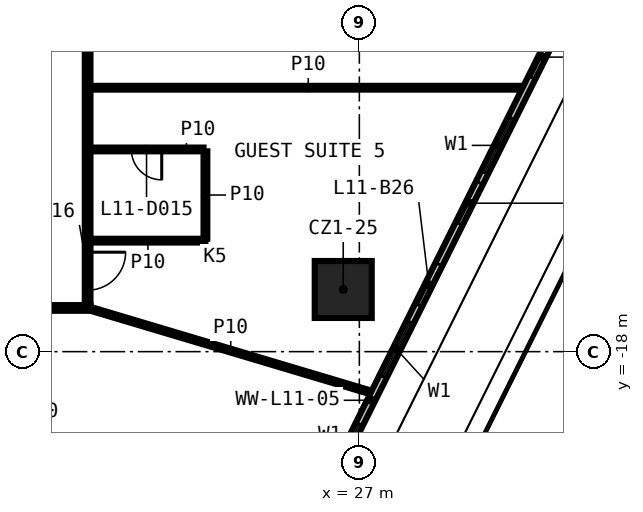
"""IFC4 building model, lengths in metres.
Left out: names, types, materials, properties, quantities, classifications, styles, units other than length and angle.
Written with IfcOpenShell. Run it as: python <this file> out.ifc"""

import sys

from ifc_helpers import new_model, si_unit, direction, frame, frame_2d, origin, origin_2d, place, context, subcontext, project, spatial, rectangle, extrude, element, fill, save


model = new_model("IFC4")
c1 = context("Model", 3, precision=1e-05, world=origin(), true_north=direction((0.0, 1.0)))
c2 = subcontext(c1, "Body", "Model", "MODEL_VIEW")
j1 = project(units=[si_unit("LENGTHUNIT", "METRE"), si_unit("PLANEANGLEUNIT", "RADIAN")], contexts=[c1])
p1 = place(None, origin())
s1 = spatial("IfcSite", under=j1, at=p1, CompositionType="ELEMENT")
p2 = place(p1, origin())
s2 = spatial("IfcBuilding", under=s1, at=p2, CompositionType="ELEMENT")
p3 = place(p2, frame((0.0, 0.0, 62.5)))
s3 = spatial("IfcBuildingStorey", under=s2, at=p3, CompositionType="ELEMENT", Elevation=62.5)
p4 = place(p3, frame((26.576, -16.364, 0.0), z_axis=(0.0, 0.0, 1.0), x_axis=(1.0, 0.0, 0.0)))
e1 = element("IfcColumn", 1, at=p4, inside=s3, PredefinedType="COLUMN", context=c2, shape_type="SweptSolid", body=[
    extrude(rectangle(XDim=1.5, YDim=1.5, at=origin_2d()), origin(), (0.0, 0.0, 1.0), 3.3),
])
p5 = place(p3, frame((19.925, -16.85, 0.0), z_axis=(0.0, 0.0, 1.0), x_axis=(-1.0, 0.0, 0.0)))
e2 = element("IfcWall", 2, at=p5, inside=s3, PredefinedType="PARTITIONING", context=c2, shape_type="SweptSolid", body=[
    extrude(rectangle(XDim=39.85, YDim=0.15, at=frame_2d((19.925, 0.0))), origin(), (0.0, 0.0, 1.0), 3.3),
])
p6 = place(p5, frame((35.041, 0.0, 0.0)))
e3 = element("IfcOpeningElement", 3, at=p6, cuts=e2, PredefinedType="OPENING", context=c2, shape_type="SweptSolid", body=[
    extrude(rectangle(XDim=0.9, YDim=2.1, at=frame_2d((0.45, 1.05))), frame((0.0, 0.085, 0.0), z_axis=(0.0, -1.0, 0.0), x_axis=(1.0, 0.0, 0.0)), (0.0, 0.0, 1.0), 0.17),
])
p7 = place(p5, frame((31.0, 0.0, 0.0)))
e4 = element("IfcOpeningElement", 4, at=p7, cuts=e2, PredefinedType="OPENING", context=c2, shape_type="SweptSolid", body=[
    extrude(rectangle(XDim=1.0, YDim=2.1, at=frame_2d((0.5, 1.05))), frame((0.0, 0.085, 0.0), z_axis=(0.0, -1.0, 0.0), x_axis=(1.0, 0.0, 0.0)), (0.0, 0.0, 1.0), 0.17),
])
p8 = place(p5, frame((25.711, 0.0, 0.0)))
e5 = element("IfcOpeningElement", 5, at=p8, cuts=e2, PredefinedType="OPENING", context=c2, shape_type="SweptSolid", body=[
    extrude(rectangle(XDim=0.9, YDim=2.1, at=frame_2d((0.45, 1.05))), frame((0.0, 0.085, 0.0), z_axis=(0.0, -1.0, 0.0), x_axis=(1.0, 0.0, 0.0)), (0.0, 0.0, 1.0), 0.17),
])
p9 = place(p5, frame((22.072, 0.0, 0.0)))
e6 = element("IfcOpeningElement", 6, at=p9, cuts=e2, PredefinedType="OPENING", context=c2, shape_type="SweptSolid", body=[
    extrude(rectangle(XDim=0.9, YDim=2.1, at=frame_2d((0.45, 1.05))), frame((0.0, 0.085, 0.0), z_axis=(0.0, -1.0, 0.0), x_axis=(1.0, 0.0, 0.0)), (0.0, 0.0, 1.0), 0.17),
])
p10 = place(p5, frame((17.034, 0.0, 0.0)))
e7 = element("IfcOpeningElement", 7, at=p10, cuts=e2, PredefinedType="OPENING", context=c2, shape_type="SweptSolid", body=[
    extrude(rectangle(XDim=0.9, YDim=2.1, at=frame_2d((0.45, 1.05))), frame((0.0, 0.085, 0.0), z_axis=(0.0, -1.0, 0.0), x_axis=(1.0, 0.0, 0.0)), (0.0, 0.0, 1.0), 0.17),
])
p11 = place(p5, frame((13.675, 0.0, 0.0)))
e8 = element("IfcOpeningElement", 8, at=p11, cuts=e2, PredefinedType="OPENING", context=c2, shape_type="SweptSolid", body=[
    extrude(rectangle(XDim=0.9, YDim=2.1, at=frame_2d((0.45, 1.05))), frame((0.0, 0.085, 0.0), z_axis=(0.0, -1.0, 0.0), x_axis=(1.0, 0.0, 0.0)), (0.0, 0.0, 1.0), 0.17),
])
p12 = place(p5, frame((4.031, 0.0, 0.0)))
e9 = element("IfcOpeningElement", 9, at=p12, cuts=e2, PredefinedType="OPENING", context=c2, shape_type="SweptSolid", body=[
    extrude(rectangle(XDim=1.0, YDim=2.1, at=frame_2d((0.5, 1.05))), frame((0.0, 0.085, 0.0), z_axis=(0.0, -1.0, 0.0), x_axis=(1.0, 0.0, 0.0)), (0.0, 0.0, 1.0), 0.17),
])
p13 = place(p3, frame((19.925, -15.079, 0.0), z_axis=(0.0, 0.0, 1.0), x_axis=(1.0, 0.0, 0.0)))
e10 = element("IfcWall", 10, at=p13, inside=s3, PredefinedType="PARTITIONING", context=c2, shape_type="SweptSolid", body=[
    extrude(rectangle(XDim=3.025, YDim=0.1, at=frame_2d((1.512, 0.0))), origin(), (0.0, 0.0, 1.0), 3.3),
])
p14 = place(p3, frame((22.9, -12.679, 0.0), z_axis=(0.0, 0.0, 1.0), x_axis=(-1.0, 0.0, 0.0)))
e11 = element("IfcWall", 11, at=p14, inside=s3, PredefinedType="PARTITIONING", context=c2, shape_type="SweptSolid", body=[
    extrude(rectangle(XDim=2.975, YDim=0.1, at=frame_2d((1.487, 0.0))), origin(), (0.0, 0.0, 1.0), 3.3),
])
p15 = place(p14, frame((1.1, 0.0, 0.0)))
e12 = element("IfcOpeningElement", 12, at=p15, cuts=e11, PredefinedType="OPENING", context=c2, shape_type="SweptSolid", body=[
    extrude(rectangle(XDim=0.8, YDim=2.1, at=frame_2d((0.4, 1.05))), frame((0.0, 0.06, 0.0), z_axis=(0.0, -1.0, 0.0), x_axis=(1.0, 0.0, 0.0)), (0.0, 0.0, 1.0), 0.12),
])
p16 = place(p3, frame((19.925, -11.055, 0.0), z_axis=(0.0, 0.0, 1.0), x_axis=(1.0, 0.0, 0.0)))
e13 = element("IfcWall", 13, at=p16, inside=s3, PredefinedType="PARTITIONING", context=c2, shape_type="SweptSolid", body=[
    extrude(rectangle(XDim=11.46, YDim=0.1, at=frame_2d((5.73, 0.0))), origin(), (0.0, 0.0, 1.0), 3.3),
])
p17 = place(p3, frame((22.95, -15.029, 0.0), z_axis=(0.0, 0.0, 1.0), x_axis=(0.0, 1.0, 0.0)))
e14 = element("IfcWall", 14, at=p17, inside=s3, PredefinedType="PARTITIONING", context=c2, shape_type="SweptSolid", body=[
    extrude(rectangle(XDim=2.3, YDim=0.1, at=frame_2d((1.15, 0.0))), origin(), (0.0, 0.0, 1.0), 3.3),
])
p18 = place(p3, frame((19.85, 16.775, 0.0), z_axis=(0.0, 0.0, 1.0), x_axis=(0.0, -1.0, 0.0)))
e15 = element("IfcWall", 15, at=p18, inside=s3, PredefinedType="PARTITIONING", context=c2, shape_type="SweptSolid", body=[
    extrude(rectangle(XDim=33.55, YDim=0.15, at=frame_2d((16.775, 0.0))), origin(), (0.0, 0.0, 1.0), 3.3),
])
p19 = place(p18, frame((32.158, 0.0, 0.0)))
e16 = element("IfcOpeningElement", 16, at=p19, cuts=e15, PredefinedType="OPENING", context=c2, shape_type="SweptSolid", body=[
    extrude(rectangle(XDim=1.0, YDim=2.1, at=frame_2d((0.5, 1.05))), frame((0.0, 0.085, 0.0), z_axis=(0.0, -1.0, 0.0), x_axis=(1.0, 0.0, 0.0)), (0.0, 0.0, 1.0), 0.17),
])
p20 = place(p18, frame((20.094, 0.0, 0.0)))
e17 = element("IfcOpeningElement", 17, at=p20, cuts=e15, PredefinedType="OPENING", context=c2, shape_type="SweptSolid", body=[
    extrude(rectangle(XDim=1.0, YDim=2.1, at=frame_2d((0.5, 1.05))), frame((0.0, 0.085, 0.0), z_axis=(0.0, -1.0, 0.0), x_axis=(1.0, 0.0, 0.0)), (0.0, 0.0, 1.0), 0.17),
])
p21 = place(p18, frame((18.428, 0.0, 0.0)))
e18 = element("IfcOpeningElement", 18, at=p21, cuts=e15, PredefinedType="OPENING", context=c2, shape_type="SweptSolid", body=[
    extrude(rectangle(XDim=1.0, YDim=2.1, at=frame_2d((0.5, 1.05))), frame((0.0, 0.085, 0.0), z_axis=(0.0, -1.0, 0.0), x_axis=(1.0, 0.0, 0.0)), (0.0, 0.0, 1.0), 0.17),
])
p22 = place(p18, frame((10.072, 0.0, 0.0)))
e19 = element("IfcOpeningElement", 19, at=p22, cuts=e15, PredefinedType="OPENING", context=c2, shape_type="SweptSolid", body=[
    extrude(rectangle(XDim=1.0, YDim=2.1, at=frame_2d((0.5, 1.05))), frame((0.0, 0.085, 0.0), z_axis=(0.0, -1.0, 0.0), x_axis=(1.0, 0.0, 0.0)), (0.0, 0.0, 1.0), 0.17),
])
p23 = place(p18, frame((3.156, 0.0, 0.0)))
e20 = element("IfcOpeningElement", 20, at=p23, cuts=e15, PredefinedType="OPENING", context=c2, shape_type="SweptSolid", body=[
    extrude(rectangle(XDim=1.0, YDim=2.1, at=frame_2d((0.5, 1.05))), frame((0.0, 0.085, 0.0), z_axis=(0.0, -1.0, 0.0), x_axis=(1.0, 0.0, 0.0)), (0.0, 0.0, 1.0), 0.17),
])
p24 = place(p3, frame((19.85, -16.85, 0.0), z_axis=(0.0, 0.0, 1.0), x_axis=(0.958273131703, -0.285854167464, 0.0)))
e21 = element("IfcWall", 21, at=p24, inside=s3, PredefinedType="PARTITIONING", context=c2, shape_type="SweptSolid", body=[
    extrude(rectangle(XDim=7.859, YDim=0.1, at=frame_2d((3.93, 0.0))), origin(), (0.0, 0.0, 1.0), 3.3),
])
p25 = place(p3, frame((21.391, -31.175, 0.0), z_axis=(0.0, 0.0, 1.0), x_axis=(0.445673586032, 0.895195539932, 0.0)))
e22 = element("IfcWall", 22, at=p25, inside=s3, PredefinedType="SOLIDWALL", context=c2, shape_type="SweptSolid", body=[
    extrude(rectangle(XDim=31.466, YDim=0.2, at=frame_2d((15.733, 0.0))), origin(), (0.0, 0.0, 1.0), 3.3),
])
p26 = place(p25, frame((2.0, 0.0, 0.6)))
e23 = element("IfcOpeningElement", 23, at=p26, cuts=e22, PredefinedType="OPENING", context=c2, shape_type="SweptSolid", body=[
    extrude(rectangle(XDim=1.6, YDim=2.4, at=frame_2d((0.8, 1.2))), frame((0.0, 0.11, 0.0), z_axis=(0.0, -1.0, 0.0), x_axis=(1.0, 0.0, 0.0)), (0.0, 0.0, 1.0), 0.22),
])
p27 = place(p25, frame((0.5, 0.0, 0.0)))
e24 = element("IfcOpeningElement", 24, at=p27, cuts=e22, PredefinedType="OPENING", context=c2, shape_type="SweptSolid", body=[
    extrude(rectangle(XDim=1.2, YDim=2.4, at=frame_2d((0.6, 1.2))), frame((0.0, 0.11, 0.0), z_axis=(0.0, -1.0, 0.0), x_axis=(1.0, 0.0, 0.0)), (0.0, 0.0, 1.0), 0.22),
])
p28 = place(p25, frame((4.995, 0.0, 0.6)))
e25 = element("IfcOpeningElement", 25, at=p28, cuts=e22, PredefinedType="OPENING", context=c2, shape_type="SweptSolid", body=[
    extrude(rectangle(XDim=1.6, YDim=2.4, at=frame_2d((0.8, 1.2))), frame((0.0, 0.11, 0.0), z_axis=(0.0, -1.0, 0.0), x_axis=(1.0, 0.0, 0.0)), (0.0, 0.0, 1.0), 0.22),
])
p29 = place(p25, frame((7.495, 0.0, 0.0)))
e26 = element("IfcOpeningElement", 26, at=p29, cuts=e22, PredefinedType="OPENING", context=c2, shape_type="SweptSolid", body=[
    extrude(rectangle(XDim=1.2, YDim=2.4, at=frame_2d((0.6, 1.2))), frame((0.0, 0.11, 0.0), z_axis=(0.0, -1.0, 0.0), x_axis=(1.0, 0.0, 0.0)), (0.0, 0.0, 1.0), 0.22),
])
p30 = place(p25, frame((10.99, 0.0, 0.6)))
e27 = element("IfcOpeningElement", 27, at=p30, cuts=e22, PredefinedType="OPENING", context=c2, shape_type="SweptSolid", body=[
    extrude(rectangle(XDim=1.6, YDim=2.4, at=frame_2d((0.8, 1.2))), frame((0.0, 0.11, 0.0), z_axis=(0.0, -1.0, 0.0), x_axis=(1.0, 0.0, 0.0)), (0.0, 0.0, 1.0), 0.22),
])
p31 = place(p25, frame((9.49, 0.0, 0.0)))
e28 = element("IfcOpeningElement", 28, at=p31, cuts=e22, PredefinedType="OPENING", context=c2, shape_type="SweptSolid", body=[
    extrude(rectangle(XDim=1.2, YDim=2.4, at=frame_2d((0.6, 1.2))), frame((0.0, 0.11, 0.0), z_axis=(0.0, -1.0, 0.0), x_axis=(1.0, 0.0, 0.0)), (0.0, 0.0, 1.0), 0.22),
])
p32 = place(p25, frame((13.986, 0.0, 0.6)))
e29 = element("IfcOpeningElement", 29, at=p32, cuts=e22, PredefinedType="OPENING", context=c2, shape_type="SweptSolid", body=[
    extrude(rectangle(XDim=1.6, YDim=2.4, at=frame_2d((0.8, 1.2))), frame((0.0, 0.11, 0.0), z_axis=(0.0, -1.0, 0.0), x_axis=(1.0, 0.0, 0.0)), (0.0, 0.0, 1.0), 0.22),
])
p33 = place(p25, frame((16.085, 0.0, 0.0)))
e30 = element("IfcOpeningElement", 30, at=p33, cuts=e22, PredefinedType="OPENING", context=c2, shape_type="SweptSolid", body=[
    extrude(rectangle(XDim=1.2, YDim=2.4, at=frame_2d((0.6, 1.2))), frame((0.0, 0.11, 0.0), z_axis=(0.0, -1.0, 0.0), x_axis=(1.0, 0.0, 0.0)), (0.0, 0.0, 1.0), 0.22),
])
p34 = place(p25, frame((19.981, 0.0, 0.6)))
e31 = element("IfcOpeningElement", 31, at=p34, cuts=e22, PredefinedType="OPENING", context=c2, shape_type="SweptSolid", body=[
    extrude(rectangle(XDim=1.6, YDim=2.4, at=frame_2d((0.8, 1.2))), frame((0.0, 0.11, 0.0), z_axis=(0.0, -1.0, 0.0), x_axis=(1.0, 0.0, 0.0)), (0.0, 0.0, 1.0), 0.22),
])
p35 = place(p25, frame((18.481, 0.0, 0.0)))
e32 = element("IfcOpeningElement", 32, at=p35, cuts=e22, PredefinedType="OPENING", context=c2, shape_type="SweptSolid", body=[
    extrude(rectangle(XDim=1.2, YDim=2.4, at=frame_2d((0.6, 1.2))), frame((0.0, 0.11, 0.0), z_axis=(0.0, -1.0, 0.0), x_axis=(1.0, 0.0, 0.0)), (0.0, 0.0, 1.0), 0.22),
])
p36 = place(p25, frame((24.476, 0.0, 0.6)))
e33 = element("IfcOpeningElement", 33, at=p36, cuts=e22, PredefinedType="OPENING", context=c2, shape_type="SweptSolid", body=[
    extrude(rectangle(XDim=1.6, YDim=2.4, at=frame_2d((0.8, 1.2))), frame((0.0, 0.11, 0.0), z_axis=(0.0, -1.0, 0.0), x_axis=(1.0, 0.0, 0.0)), (0.0, 0.0, 1.0), 0.22),
])
p37 = place(p25, frame((22.776, 0.0, 0.0)))
e34 = element("IfcOpeningElement", 34, at=p37, cuts=e22, PredefinedType="OPENING", context=c2, shape_type="SweptSolid", body=[
    extrude(rectangle(XDim=1.2, YDim=2.4, at=frame_2d((0.6, 1.2))), frame((0.0, 0.11, 0.0), z_axis=(0.0, -1.0, 0.0), x_axis=(1.0, 0.0, 0.0)), (0.0, 0.0, 1.0), 0.22),
])
p38 = place(p25, frame((28.971, 0.0, 0.6)))
e35 = element("IfcOpeningElement", 35, at=p38, cuts=e22, PredefinedType="OPENING", context=c2, shape_type="SweptSolid", body=[
    extrude(rectangle(XDim=1.6, YDim=2.4, at=frame_2d((0.8, 1.2))), frame((0.0, 0.11, 0.0), z_axis=(0.0, -1.0, 0.0), x_axis=(1.0, 0.0, 0.0)), (0.0, 0.0, 1.0), 0.22),
])
p39 = place(p25, frame((27.471, 0.0, 0.0)))
e36 = element("IfcOpeningElement", 36, at=p39, cuts=e22, PredefinedType="OPENING", context=c2, shape_type="SweptSolid", body=[
    extrude(rectangle(XDim=1.2, YDim=2.4, at=frame_2d((0.6, 1.2))), frame((0.0, 0.11, 0.0), z_axis=(0.0, -1.0, 0.0), x_axis=(1.0, 0.0, 0.0)), (0.0, 0.0, 1.0), 0.22),
])
p40 = place(p15, origin())
e37 = element("IfcDoor", 37, at=p40, inside=s3, OperationType="SINGLE_SWING_LEFT", PredefinedType="DOOR", context=c2, shape_type="SweptSolid", body=[
    extrude(rectangle(XDim=0.8, YDim=2.1, at=frame_2d((0.4, 1.05))), frame((0.0, 0.025, 0.0), z_axis=(0.0, -1.0, 0.0), x_axis=(1.0, 0.0, 0.0)), (0.0, 0.0, 1.0), 0.05),
])
fill(e12, e37)
p41 = place(p19, origin())
e38 = element("IfcDoor", 38, at=p41, inside=s3, OperationType="SINGLE_SWING_RIGHT", PredefinedType="DOOR", context=c2, shape_type="SweptSolid", body=[
    extrude(rectangle(XDim=1.0, YDim=2.1, at=frame_2d((0.5, 1.05))), frame((0.0, 0.025, 0.0), z_axis=(0.0, -1.0, 0.0), x_axis=(1.0, 0.0, 0.0)), (0.0, 0.0, 1.0), 0.05),
])
fill(e16, e38)
p42 = place(p30, origin())
e39 = element("IfcWindow", 39, at=p42, inside=s3, PartitioningType="SINGLE_PANEL", PredefinedType="WINDOW", context=c2, shape_type="SweptSolid", body=[
    extrude(rectangle(XDim=1.6, YDim=2.4, at=frame_2d((0.8, 1.2))), frame((0.0, 0.03, 0.0), z_axis=(0.0, -1.0, 0.0), x_axis=(1.0, 0.0, 0.0)), (0.0, 0.0, 1.0), 0.06),
])
fill(e27, e39)
p43 = place(p32, origin())
e40 = element("IfcWindow", 40, at=p43, inside=s3, PartitioningType="SINGLE_PANEL", PredefinedType="WINDOW", context=c2, shape_type="SweptSolid", body=[
    extrude(rectangle(XDim=1.6, YDim=2.4, at=frame_2d((0.8, 1.2))), frame((0.0, 0.03, 0.0), z_axis=(0.0, -1.0, 0.0), x_axis=(1.0, 0.0, 0.0)), (0.0, 0.0, 1.0), 0.06),
])
fill(e29, e40)
p44 = place(p33, origin())
e41 = element("IfcDoor", 41, at=p44, inside=s3, OperationType="SLIDING_TO_LEFT", PredefinedType="DOOR", context=c2, shape_type="SweptSolid", body=[
    extrude(rectangle(XDim=1.2, YDim=2.4, at=frame_2d((0.6, 1.2))), frame((0.0, 0.025, 0.0), z_axis=(0.0, -1.0, 0.0), x_axis=(1.0, 0.0, 0.0)), (0.0, 0.0, 1.0), 0.05),
])
fill(e30, e41)
p45 = place(p34, origin())
e42 = element("IfcWindow", 42, at=p45, inside=s3, PartitioningType="SINGLE_PANEL", PredefinedType="WINDOW", context=c2, shape_type="SweptSolid", body=[
    extrude(rectangle(XDim=1.6, YDim=2.4, at=frame_2d((0.8, 1.2))), frame((0.0, 0.03, 0.0), z_axis=(0.0, -1.0, 0.0), x_axis=(1.0, 0.0, 0.0)), (0.0, 0.0, 1.0), 0.06),
])
fill(e31, e42)
p46 = place(p35, origin())
e43 = element("IfcDoor", 43, at=p46, inside=s3, OperationType="SLIDING_TO_LEFT", PredefinedType="DOOR", context=c2, shape_type="SweptSolid", body=[
    extrude(rectangle(XDim=1.2, YDim=2.4, at=frame_2d((0.6, 1.2))), frame((0.0, 0.025, 0.0), z_axis=(0.0, -1.0, 0.0), x_axis=(1.0, 0.0, 0.0)), (0.0, 0.0, 1.0), 0.05),
])
fill(e32, e43)
p47 = place(p37, origin())
e44 = element("IfcDoor", 44, at=p47, inside=s3, OperationType="SLIDING_TO_LEFT", PredefinedType="DOOR", context=c2, shape_type="SweptSolid", body=[
    extrude(rectangle(XDim=1.2, YDim=2.4, at=frame_2d((0.6, 1.2))), frame((0.0, 0.025, 0.0), z_axis=(0.0, -1.0, 0.0), x_axis=(1.0, 0.0, 0.0)), (0.0, 0.0, 1.0), 0.05),
])
fill(e34, e44)
save(model, sys.argv[1])
